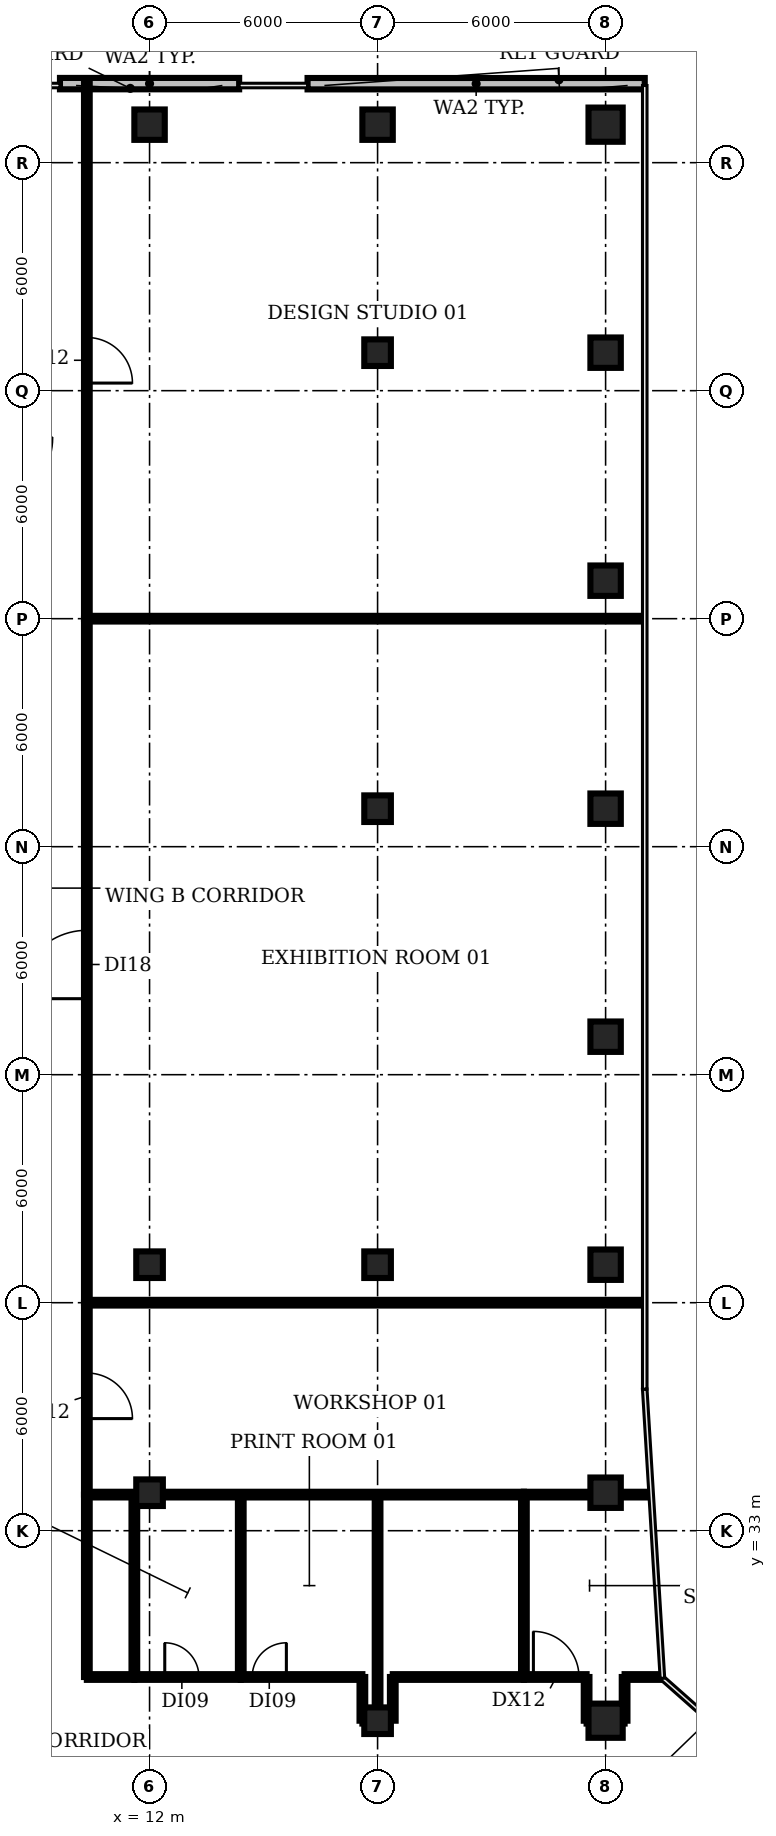
"""IFC4 building model, lengths in metres.
Left out: names, types, materials, properties, quantities, classifications, styles, units other than length and angle.
Written with IfcOpenShell. Run it as: python <this file> out.ifc"""

import sys

from ifc_helpers import new_model, si_unit, direction, frame, frame_2d, origin, origin_2d, place, context, subcontext, project, spatial, rectangle, circle, extrude, element, fill, save


model = new_model("IFC4")
c1 = context("Model", 3, precision=1e-05, world=origin(), true_north=direction((0.0, 1.0)))
c2 = subcontext(c1, "Body", "Model", "MODEL_VIEW")
j1 = project(units=[si_unit("LENGTHUNIT", "METRE"), si_unit("PLANEANGLEUNIT", "RADIAN")], contexts=[c1])
p1 = place(None, origin())
s1 = spatial("IfcSite", under=j1, at=p1, CompositionType="ELEMENT")
p2 = place(p1, origin())
s2 = spatial("IfcBuilding", under=s1, at=p2, CompositionType="ELEMENT")
p3 = place(p2, frame((0.0, 0.0, 213.8)))
s3 = spatial("IfcBuildingStorey", under=s2, at=p3, CompositionType="ELEMENT", Elevation=213.8)
for number, where, z_axis, x_axis in (
    (1, (12.0, 34.0, 0.0), (0.0, 0.0, 1.0), (1.0, 0.0, 0.0)),
    (2, (12.0, 40.0, 0.0), (0.0, 0.0, 1.0), (1.0, 0.0, 0.0)),
):
    element("IfcColumn", number, at=place(p3, frame(where, z_axis=z_axis, x_axis=x_axis)), inside=s3, PredefinedType="COLUMN", context=c2, shape_type="SweptSolid", body=[
        extrude(rectangle(XDim=0.7, YDim=0.7, at=origin_2d()), origin(), (0.0, 0.0, 1.0), 3.85),
    ])
p4 = place(p3, frame((12.0, 70.0, 0.0), z_axis=(0.0, 0.0, 1.0), x_axis=(1.0, 0.0, 0.0)))
e3 = element("IfcColumn", 3, at=p4, inside=s3, PredefinedType="COLUMN", context=c2, shape_type="SweptSolid", body=[
    extrude(rectangle(XDim=0.8, YDim=0.8, at=origin_2d()), origin(), (0.0, 0.0, 1.0), 3.85),
])
for number, where, z_axis, x_axis in (
    (4, (18.0, 28.0, 0.0), (0.0, 0.0, 1.0), (1.0, 0.0, 0.0)),
    (5, (18.0, 40.0, 0.0), (0.0, 0.0, 1.0), (1.0, 0.0, 0.0)),
    (6, (18.0, 52.0, 0.0), (0.0, 0.0, 1.0), (1.0, 0.0, 0.0)),
    (7, (18.0, 64.0, 0.0), (0.0, 0.0, 1.0), (1.0, 0.0, 0.0)),
):
    element("IfcColumn", number, at=place(p3, frame(where, z_axis=z_axis, x_axis=x_axis)), inside=s3, PredefinedType="COLUMN", context=c2, shape_type="SweptSolid", body=[
        extrude(rectangle(XDim=0.7, YDim=0.7, at=origin_2d()), origin(), (0.0, 0.0, 1.0), 3.85),
    ])
p5 = place(p3, frame((18.0, 70.0, 0.0), z_axis=(0.0, 0.0, 1.0), x_axis=(1.0, 0.0, 0.0)))
e8 = element("IfcColumn", 8, at=p5, inside=s3, PredefinedType="COLUMN", context=c2, shape_type="SweptSolid", body=[
    extrude(rectangle(XDim=0.8, YDim=0.8, at=origin_2d()), origin(), (0.0, 0.0, 1.0), 3.85),
])
p6 = place(p3, frame((24.0, 28.0, 0.0), z_axis=(0.0, 0.0, 1.0), x_axis=(1.0, 0.0, 0.0)))
e9 = element("IfcColumn", 9, at=p6, inside=s3, PredefinedType="COLUMN", context=c2, shape_type="SweptSolid", body=[
    extrude(circle(Radius=0.45, at=origin_2d()), origin(), (0.0, 0.0, 1.0), 3.85),
])
for number, where, z_axis, x_axis in (
    (10, (24.0, 34.0, 0.0), (0.0, 0.0, 1.0), (1.0, 0.0, 0.0)),
    (11, (24.0, 40.0, 0.0), (0.0, 0.0, 1.0), (1.0, 0.0, 0.0)),
    (12, (24.0, 46.0, 0.0), (0.0, 0.0, 1.0), (1.0, 0.0, 0.0)),
    (13, (24.0, 52.0, 0.0), (0.0, 0.0, 1.0), (1.0, 0.0, 0.0)),
    (14, (24.0, 58.0, 0.0), (0.0, 0.0, 1.0), (1.0, 0.0, 0.0)),
    (15, (24.0, 64.0, 0.0), (0.0, 0.0, 1.0), (1.0, 0.0, 0.0)),
):
    element("IfcColumn", number, at=place(p3, frame(where, z_axis=z_axis, x_axis=x_axis)), inside=s3, PredefinedType="COLUMN", context=c2, shape_type="SweptSolid", body=[
        extrude(rectangle(XDim=0.8, YDim=0.8, at=origin_2d()), origin(), (0.0, 0.0, 1.0), 3.85),
    ])
p7 = place(p3, frame((24.0, 70.0, 0.0), z_axis=(0.0, 0.0, 1.0), x_axis=(1.0, 0.0, 0.0)))
e16 = element("IfcColumn", 16, at=p7, inside=s3, PredefinedType="COLUMN", context=c2, shape_type="SweptSolid", body=[
    extrude(circle(Radius=0.45, at=origin_2d()), origin(), (0.0, 0.0, 1.0), 3.85),
])
p8 = place(p3, frame((25.03, 71.078, 0.0), z_axis=(0.0, 0.0, 1.0), x_axis=(-1.0, 0.0, 0.0)))
e17 = element("IfcWall", 17, at=p8, inside=s3, PredefinedType="SOLIDWALL", context=c2, shape_type="SweptSolid", body=[
    extrude(rectangle(XDim=8.873, YDim=0.3, at=frame_2d((4.436, 0.0))), origin(), (0.0, 0.0, 1.0), 3.85),
])
p9 = place(p3, frame((14.357, 71.08, 0.0), z_axis=(0.0, 0.0, 1.0), x_axis=(-1.0, 0.0, 0.0)))
e18 = element("IfcWall", 18, at=p9, inside=s3, PredefinedType="SOLIDWALL", context=c2, shape_type="SweptSolid", body=[
    extrude(rectangle(XDim=4.715, YDim=0.3, at=frame_2d((2.357, 0.0))), origin(), (0.0, 0.0, 1.0), 3.85),
])
p10 = place(p3, frame((10.35, 29.15, 0.0), z_axis=(0.0, 0.0, 1.0), x_axis=(0.0, 1.0, 0.0)))
e19 = element("IfcWall", 19, at=p10, inside=s3, PredefinedType="PARTITIONING", context=c2, shape_type="SweptSolid", body=[
    extrude(rectangle(XDim=4.8, YDim=0.15, at=frame_2d((2.4, 0.0))), origin(), (0.0, 0.0, 1.0), 2.88),
])
p11 = place(p3, frame((10.35, 29.15, 0.0), z_axis=(0.0, 0.0, 1.0), x_axis=(1.0, 0.0, 0.0)))
e20 = element("IfcWall", 20, at=p11, inside=s3, PredefinedType="PARTITIONING", context=c2, shape_type="SweptSolid", body=[
    extrude(rectangle(XDim=1.25, YDim=0.15, at=frame_2d((0.625, 0.0))), origin(), (0.0, 0.0, 1.0), 2.88),
])
p12 = place(p3, frame((10.35, 33.95, 0.0), z_axis=(0.0, 0.0, 1.0), x_axis=(1.0, 0.0, 0.0)))
e21 = element("IfcWall", 21, at=p12, inside=s3, PredefinedType="PARTITIONING", context=c2, shape_type="SweptSolid", body=[
    extrude(rectangle(XDim=1.242, YDim=0.15, at=frame_2d((0.621, 0.0))), origin(), (0.0, 0.0, 1.0), 2.88),
])
p13 = place(p3, frame((10.35, 39.0, 0.0), z_axis=(0.0, 0.0, 1.0), x_axis=(0.0, -1.0, 0.0)))
e22 = element("IfcWall", 22, at=p13, inside=s3, PredefinedType="PARTITIONING", context=c2, shape_type="SweptSolid", body=[
    extrude(rectangle(XDim=5.05, YDim=0.15, at=frame_2d((2.525, 0.0))), origin(), (0.0, 0.0, 1.0), 2.88),
])
p14 = place(p13, frame((1.85, 0.0, 0.0)))
e23 = element("IfcOpeningElement", 23, at=p14, cuts=e22, PredefinedType="OPENING", context=c2, shape_type="SweptSolid", body=[
    extrude(rectangle(XDim=1.2, YDim=2.1, at=frame_2d((0.6, 1.05))), frame((0.0, 0.085, 0.0), z_axis=(0.0, -1.0, 0.0), x_axis=(1.0, 0.0, 0.0)), (0.0, 0.0, 1.0), 0.17),
])
p15 = place(p3, frame((10.35, 39.0, 0.0), z_axis=(0.0, 0.0, 1.0), x_axis=(0.0, 1.0, 0.0)))
e24 = element("IfcWall", 24, at=p15, inside=s3, PredefinedType="PARTITIONING", context=c2, shape_type="SweptSolid", body=[
    extrude(rectangle(XDim=18.0, YDim=0.15, at=frame_2d((9.0, 0.0))), origin(), (0.0, 0.0, 1.0), 2.88),
])
p16 = place(p15, frame((8.0, 0.0, 0.0)))
e25 = element("IfcOpeningElement", 25, at=p16, cuts=e24, PredefinedType="OPENING", context=c2, shape_type="SweptSolid", body=[
    extrude(rectangle(XDim=1.8, YDim=2.1, at=frame_2d((0.9, 1.05))), frame((0.0, 0.085, 0.0), z_axis=(0.0, -1.0, 0.0), x_axis=(1.0, 0.0, 0.0)), (0.0, 0.0, 1.0), 0.17),
])
for number, where, z_axis, x_axis in (
    (26, (10.35, 39.0, 0.0), (0.0, 0.0, 1.0), (1.0, 0.0, 0.0)),
    (27, (10.35, 57.0, 0.0), (0.0, 0.0, 1.0), (1.0, 0.0, 0.0)),
):
    element("IfcWall", number, at=place(p3, frame(where, z_axis=z_axis, x_axis=x_axis)), inside=s3, PredefinedType="PARTITIONING", context=c2, shape_type="SweptSolid", body=[
        extrude(rectangle(XDim=14.63, YDim=0.15, at=frame_2d((7.315, 0.0))), origin(), (0.0, 0.0, 1.0), 2.88),
    ])
p17 = place(p3, frame((10.35, 71.09, 0.0), z_axis=(0.0, 0.0, 1.0), x_axis=(0.0, -1.0, 0.0)))
e28 = element("IfcWall", 28, at=p17, inside=s3, PredefinedType="PARTITIONING", context=c2, shape_type="SweptSolid", body=[
    extrude(rectangle(XDim=14.09, YDim=0.15, at=frame_2d((7.045, 0.0))), origin(), (0.0, 0.0, 1.0), 2.88),
])
p18 = place(p17, frame((6.69, 0.0, 0.0)))
e29 = element("IfcOpeningElement", 29, at=p18, cuts=e28, PredefinedType="OPENING", context=c2, shape_type="SweptSolid", body=[
    extrude(rectangle(XDim=1.2, YDim=2.1, at=frame_2d((0.6, 1.05))), frame((0.0, 0.085, 0.0), z_axis=(0.0, -1.0, 0.0), x_axis=(1.0, 0.0, 0.0)), (0.0, 0.0, 1.0), 0.17),
])
p19 = place(p3, frame((11.6, 29.15, 0.0), z_axis=(0.0, 0.0, 1.0), x_axis=(0.0, 1.0, 0.0)))
e30 = element("IfcWall", 30, at=p19, inside=s3, PredefinedType="PARTITIONING", context=c2, shape_type="SweptSolid", body=[
    extrude(rectangle(XDim=4.72, YDim=0.15, at=frame_2d((2.36, 0.0))), origin(), (0.0, 0.0, 1.0), 2.88),
])
p20 = place(p3, frame((11.6, 29.15, 0.0), z_axis=(0.0, 0.0, 1.0), x_axis=(1.0, 0.0, 0.0)))
e31 = element("IfcWall", 31, at=p20, inside=s3, PredefinedType="PARTITIONING", context=c2, shape_type="SweptSolid", body=[
    extrude(rectangle(XDim=2.8, YDim=0.15, at=frame_2d((1.4, 0.0))), origin(), (0.0, 0.0, 1.0), 2.88),
])
p21 = place(p20, frame((0.8, 0.0, 0.0)))
e32 = element("IfcOpeningElement", 32, at=p21, cuts=e31, PredefinedType="OPENING", context=c2, shape_type="SweptSolid", body=[
    extrude(rectangle(XDim=0.9, YDim=2.1, at=frame_2d((0.45, 1.05))), frame((0.0, 0.085, 0.0), z_axis=(0.0, -1.0, 0.0), x_axis=(1.0, 0.0, 0.0)), (0.0, 0.0, 1.0), 0.17),
])
p22 = place(p3, frame((11.696, 33.95, 0.0), z_axis=(0.0, 0.0, 1.0), x_axis=(1.0, 0.0, 0.0)))
e33 = element("IfcWall", 33, at=p22, inside=s3, PredefinedType="PARTITIONING", context=c2, shape_type="SweptSolid", body=[
    extrude(rectangle(XDim=0.621, YDim=0.15, at=frame_2d((0.311, 0.0))), origin(), (0.0, 0.0, 1.0), 2.88),
])
p23 = place(p3, frame((12.42, 33.95, 0.0), z_axis=(0.0, 0.0, 1.0), x_axis=(1.0, 0.0, 0.0)))
e34 = element("IfcWall", 34, at=p23, inside=s3, PredefinedType="PARTITIONING", context=c2, shape_type="SweptSolid", body=[
    extrude(rectangle(XDim=9.43, YDim=0.15, at=frame_2d((4.715, 0.0))), origin(), (0.0, 0.0, 1.0), 2.88),
])
p24 = place(p3, frame((14.4, 29.15, 0.0), z_axis=(0.0, 0.0, 1.0), x_axis=(0.0, 1.0, 0.0)))
e35 = element("IfcWall", 35, at=p24, inside=s3, PredefinedType="PARTITIONING", context=c2, shape_type="SweptSolid", body=[
    extrude(rectangle(XDim=4.8, YDim=0.15, at=frame_2d((2.4, 0.0))), origin(), (0.0, 0.0, 1.0), 2.88),
])
p25 = place(p3, frame((14.4, 29.15, 0.0), z_axis=(0.0, 0.0, 1.0), x_axis=(1.0, 0.0, 0.0)))
e36 = element("IfcWall", 36, at=p25, inside=s3, PredefinedType="PARTITIONING", context=c2, shape_type="SweptSolid", body=[
    extrude(rectangle(XDim=3.2, YDim=0.15, at=frame_2d((1.6, 0.0))), origin(), (0.0, 0.0, 1.0), 2.88),
])
p26 = place(p25, frame((0.3, 0.0, 0.0)))
e37 = element("IfcOpeningElement", 37, at=p26, cuts=e36, PredefinedType="OPENING", context=c2, shape_type="SweptSolid", body=[
    extrude(rectangle(XDim=0.9, YDim=2.1, at=frame_2d((0.45, 1.05))), frame((0.0, 0.085, 0.0), z_axis=(0.0, -1.0, 0.0), x_axis=(1.0, 0.0, 0.0)), (0.0, 0.0, 1.0), 0.17),
])
p27 = place(p3, frame((17.6, 28.0, 0.0), z_axis=(0.0, 0.0, 1.0), x_axis=(0.0, 1.0, 0.0)))
e38 = element("IfcWall", 38, at=p27, inside=s3, PredefinedType="PARTITIONING", context=c2, shape_type="SweptSolid", body=[
    extrude(rectangle(XDim=1.15, YDim=0.15, at=frame_2d((0.575, 0.0))), origin(), (0.0, 0.0, 1.0), 2.88),
])
p28 = place(p3, frame((17.6, 28.0, 0.0), z_axis=(0.0, 0.0, 1.0), x_axis=(1.0, 0.0, 0.0)))
e39 = element("IfcWall", 39, at=p28, inside=s3, PredefinedType="PARTITIONING", context=c2, shape_type="SweptSolid", body=[
    extrude(rectangle(XDim=0.4, YDim=0.15, at=frame_2d((0.2, 0.0))), origin(), (0.0, 0.0, 1.0), 2.88),
])
p29 = place(p3, frame((18.0, 28.0, 0.0), z_axis=(0.0, 0.0, 1.0), x_axis=(0.0, 1.0, 0.0)))
e40 = element("IfcWall", 40, at=p29, inside=s3, PredefinedType="PARTITIONING", context=c2, shape_type="SweptSolid", body=[
    extrude(rectangle(XDim=5.95, YDim=0.15, at=frame_2d((2.975, 0.0))), origin(), (0.0, 0.0, 1.0), 2.88),
])
p30 = place(p3, frame((18.4, 28.0, 0.0), z_axis=(0.0, 0.0, 1.0), x_axis=(0.0, 1.0, 0.0)))
e41 = element("IfcWall", 41, at=p30, inside=s3, PredefinedType="PARTITIONING", context=c2, shape_type="SweptSolid", body=[
    extrude(rectangle(XDim=1.15, YDim=0.15, at=frame_2d((0.575, 0.0))), origin(), (0.0, 0.0, 1.0), 2.88),
])
p31 = place(p3, frame((18.4, 29.15, 0.0), z_axis=(0.0, 0.0, 1.0), x_axis=(1.0, 0.0, 0.0)))
e42 = element("IfcWall", 42, at=p31, inside=s3, PredefinedType="PARTITIONING", context=c2, shape_type="SweptSolid", body=[
    extrude(rectangle(XDim=3.45, YDim=0.15, at=frame_2d((1.725, 0.0))), origin(), (0.0, 0.0, 1.0), 2.88),
])
p32 = place(p3, frame((21.85, 29.15, 0.0), z_axis=(0.0, 0.0, 1.0), x_axis=(0.0, 1.0, 0.0)))
e43 = element("IfcWall", 43, at=p32, inside=s3, PredefinedType="PARTITIONING", context=c2, shape_type="SweptSolid", body=[
    extrude(rectangle(XDim=4.8, YDim=0.15, at=frame_2d((2.4, 0.0))), origin(), (0.0, 0.0, 1.0), 2.88),
])
p33 = place(p3, frame((21.85, 29.15, 0.0), z_axis=(0.0, 0.0, 1.0), x_axis=(1.0, 0.0, 0.0)))
e44 = element("IfcWall", 44, at=p33, inside=s3, PredefinedType="PARTITIONING", context=c2, shape_type="SweptSolid", body=[
    extrude(rectangle(XDim=1.65, YDim=0.15, at=frame_2d((0.825, 0.0))), origin(), (0.0, 0.0, 1.0), 2.88),
])
p34 = place(p33, frame((0.25, 0.0, 0.0)))
e45 = element("IfcOpeningElement", 45, at=p34, cuts=e44, PredefinedType="OPENING", context=c2, shape_type="SweptSolid", body=[
    extrude(rectangle(XDim=1.2, YDim=2.1, at=frame_2d((0.6, 1.05))), frame((0.0, 0.085, 0.0), z_axis=(0.0, -1.0, 0.0), x_axis=(1.0, 0.0, 0.0)), (0.0, 0.0, 1.0), 0.17),
])
p35 = place(p3, frame((21.85, 33.95, 0.0), z_axis=(0.0, 0.0, 1.0), x_axis=(1.0, 0.0, 0.0)))
e46 = element("IfcWall", 46, at=p35, inside=s3, PredefinedType="PARTITIONING", context=c2, shape_type="SweptSolid", body=[
    extrude(rectangle(XDim=3.3, YDim=0.15, at=frame_2d((1.65, 0.0))), origin(), (0.0, 0.0, 1.0), 2.88),
])
p36 = place(p3, frame((23.5, 28.0, 0.0), z_axis=(0.0, 0.0, 1.0), x_axis=(0.0, 1.0, 0.0)))
e47 = element("IfcWall", 47, at=p36, inside=s3, PredefinedType="PARTITIONING", context=c2, shape_type="SweptSolid", body=[
    extrude(rectangle(XDim=1.15, YDim=0.15, at=frame_2d((0.575, 0.0))), origin(), (0.0, 0.0, 1.0), 2.88),
])
p37 = place(p3, frame((23.5, 28.0, 0.0), z_axis=(0.0, 0.0, 1.0), x_axis=(1.0, 0.0, 0.0)))
e48 = element("IfcWall", 48, at=p37, inside=s3, PredefinedType="PARTITIONING", context=c2, shape_type="SweptSolid", body=[
    extrude(rectangle(XDim=1.0, YDim=0.15, at=frame_2d((0.5, 0.0))), origin(), (0.0, 0.0, 1.0), 2.88),
])
p38 = place(p3, frame((24.5, 28.0, 0.0), z_axis=(0.0, 0.0, 1.0), x_axis=(0.0, 1.0, 0.0)))
e49 = element("IfcWall", 49, at=p38, inside=s3, PredefinedType="PARTITIONING", context=c2, shape_type="SweptSolid", body=[
    extrude(rectangle(XDim=1.15, YDim=0.15, at=frame_2d((0.575, 0.0))), origin(), (0.0, 0.0, 1.0), 2.88),
])
p39 = place(p3, frame((24.5, 29.15, 0.0), z_axis=(0.0, 0.0, 1.0), x_axis=(1.0, 0.0, 0.0)))
e50 = element("IfcWall", 50, at=p39, inside=s3, PredefinedType="PARTITIONING", context=c2, shape_type="SweptSolid", body=[
    extrude(rectangle(XDim=0.933, YDim=0.15, at=frame_2d((0.467, 0.0))), origin(), (0.0, 0.0, 1.0), 2.88),
])
p40 = place(p14, origin())
e51 = element("IfcDoor", 51, at=p40, inside=s3, OperationType="SINGLE_SWING_RIGHT", PredefinedType="DOOR", context=c2, shape_type="SweptSolid", body=[
    extrude(rectangle(XDim=1.2, YDim=2.1, at=frame_2d((0.6, 1.05))), frame((0.0, 0.025, 0.0), z_axis=(0.0, -1.0, 0.0), x_axis=(1.0, 0.0, 0.0)), (0.0, 0.0, 1.0), 0.05),
])
fill(e23, e51)
p41 = place(p16, origin())
e52 = element("IfcDoor", 52, at=p41, inside=s3, OperationType="SINGLE_SWING_LEFT", PredefinedType="DOOR", context=c2, shape_type="SweptSolid", body=[
    extrude(rectangle(XDim=1.8, YDim=2.1, at=frame_2d((0.9, 1.05))), frame((0.0, 0.025, 0.0), z_axis=(0.0, -1.0, 0.0), x_axis=(1.0, 0.0, 0.0)), (0.0, 0.0, 1.0), 0.05),
])
fill(e25, e52)
p42 = place(p18, origin())
e53 = element("IfcDoor", 53, at=p42, inside=s3, OperationType="SINGLE_SWING_RIGHT", PredefinedType="DOOR", context=c2, shape_type="SweptSolid", body=[
    extrude(rectangle(XDim=1.2, YDim=2.1, at=frame_2d((0.6, 1.05))), frame((0.0, 0.025, 0.0), z_axis=(0.0, -1.0, 0.0), x_axis=(1.0, 0.0, 0.0)), (0.0, 0.0, 1.0), 0.05),
])
fill(e29, e53)
p43 = place(p21, origin())
e54 = element("IfcDoor", 54, at=p43, inside=s3, OperationType="SINGLE_SWING_LEFT", PredefinedType="DOOR", context=c2, shape_type="SweptSolid", body=[
    extrude(rectangle(XDim=0.9, YDim=2.1, at=frame_2d((0.45, 1.05))), frame((0.0, 0.025, 0.0), z_axis=(0.0, -1.0, 0.0), x_axis=(1.0, 0.0, 0.0)), (0.0, 0.0, 1.0), 0.05),
])
fill(e32, e54)
p44 = place(p26, origin())
e55 = element("IfcDoor", 55, at=p44, inside=s3, OperationType="SINGLE_SWING_RIGHT", PredefinedType="DOOR", context=c2, shape_type="SweptSolid", body=[
    extrude(rectangle(XDim=0.9, YDim=2.1, at=frame_2d((0.45, 1.05))), frame((0.0, 0.025, 0.0), z_axis=(0.0, -1.0, 0.0), x_axis=(1.0, 0.0, 0.0)), (0.0, 0.0, 1.0), 0.05),
])
fill(e37, e55)
p45 = place(p34, origin())
e56 = element("IfcDoor", 56, at=p45, inside=s3, OperationType="SINGLE_SWING_LEFT", PredefinedType="DOOR", context=c2, shape_type="SweptSolid", body=[
    extrude(rectangle(XDim=1.2, YDim=2.1, at=frame_2d((0.6, 1.05))), frame((0.0, 0.025, 0.0), z_axis=(0.0, -1.0, 0.0), x_axis=(1.0, 0.0, 0.0)), (0.0, 0.0, 1.0), 0.05),
])
fill(e45, e56)
save(model, sys.argv[1])
